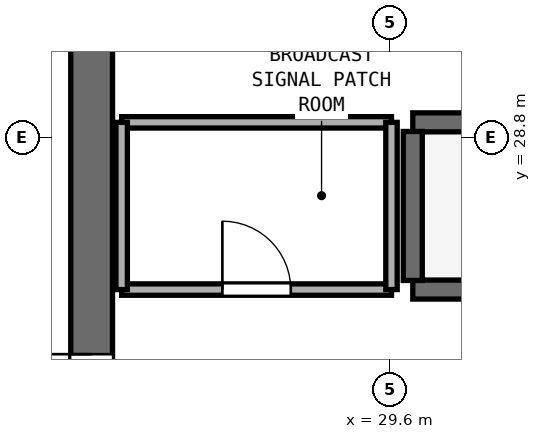
"""IFC4 building model, lengths in metres.
Left out: names, types, materials, properties, quantities, classifications, styles, units other than length and angle.
Written with IfcOpenShell. Run it as: python <this file> out.ifc"""

import sys

from ifc_helpers import new_model, si_unit, direction, frame, frame_2d, origin, place, context, subcontext, project, spatial, rectangle, extrude, element, fill, save


model = new_model("IFC4")
c1 = context("Model", 3, precision=1e-05, world=origin(), true_north=direction((0.0, 1.0)))
c2 = subcontext(c1, "Body", "Model", "MODEL_VIEW")
j1 = project(units=[si_unit("LENGTHUNIT", "METRE"), si_unit("PLANEANGLEUNIT", "RADIAN")], contexts=[c1])
p1 = place(None, origin())
s1 = spatial("IfcSite", under=j1, at=p1, CompositionType="ELEMENT")
p2 = place(p1, origin())
s2 = spatial("IfcBuilding", under=s1, at=p2, CompositionType="ELEMENT")
p3 = place(p2, frame((0.0, 0.0, 189.6)))
s3 = spatial("IfcBuildingStorey", under=s2, at=p3, CompositionType="ELEMENT", Elevation=189.6)
p4 = place(p3, frame((25.675, 17.55, 0.0), z_axis=(0.0, 0.0, 1.0), x_axis=(0.0, 1.0, 0.0)))
e1 = element("IfcWall", 1, at=p4, inside=s3, PredefinedType="SHEAR", context=c2, shape_type="SweptSolid", body=[
    extrude(rectangle(XDim=15.3, YDim=0.55, at=frame_2d((7.65, 0.0))), origin(), (0.0, 0.0, 1.0), 3.54),
])
p5 = place(p4, frame((6.9, 0.0, 0.0)))
e2 = element("IfcOpeningElement", 2, at=p5, cuts=e1, PredefinedType="OPENING", context=c2, shape_type="SweptSolid", body=[
    extrude(rectangle(XDim=1.5, YDim=2.15, at=frame_2d((0.75, 1.075))), frame((0.0, 0.285, 0.0), z_axis=(0.0, -1.0, 0.0), x_axis=(1.0, 0.0, 0.0)), (0.0, 0.0, 1.0), 0.57),
])
for number, where, z_axis, x_axis in (
    (3, (29.9, 26.8, 0.0), (0.0, 0.0, 1.0), (1.0, 0.0, 0.0)),
    (4, (29.9, 29.0, 0.0), (0.0, 0.0, 1.0), (1.0, 0.0, 0.0)),
):
    element("IfcWall", number, at=place(p3, frame(where, z_axis=z_axis, x_axis=x_axis)), inside=s3, PredefinedType="SHEAR", context=c2, shape_type="SweptSolid", body=[
        extrude(rectangle(XDim=1.72, YDim=0.25, at=frame_2d((0.86, 0.0))), origin(), (0.0, 0.0, 1.0), 3.54),
    ])
p6 = place(p3, frame((29.9, 26.92, 0.0), z_axis=(0.0, 0.0, 1.0), x_axis=(0.0, 1.0, 0.0)))
e5 = element("IfcWall", 5, at=p6, inside=s3, PredefinedType="SHEAR", context=c2, shape_type="SweptSolid", body=[
    extrude(rectangle(XDim=1.96, YDim=0.25, at=frame_2d((0.98, 0.0))), origin(), (0.0, 0.0, 1.0), 3.54),
])
p7 = place(p3, frame((26.07, 26.8, 0.0), z_axis=(0.0, 0.0, 1.0), x_axis=(1.0, 0.0, 0.0)))
e6 = element("IfcWall", 6, at=p7, inside=s3, PredefinedType="PARTITIONING", context=c2, shape_type="SweptSolid", body=[
    extrude(rectangle(XDim=3.55, YDim=0.15, at=frame_2d((1.775, 0.0))), origin(), (0.0, 0.0, 1.0), 3.54),
])
p8 = place(p7, frame((1.325, 0.0, 0.0)))
e7 = element("IfcOpeningElement", 7, at=p8, cuts=e6, PredefinedType="OPENING", context=c2, shape_type="SweptSolid", body=[
    extrude(rectangle(XDim=0.9, YDim=2.1, at=frame_2d((0.45, 1.05))), frame((0.0, 0.085, 0.0), z_axis=(0.0, -1.0, 0.0), x_axis=(1.0, 0.0, 0.0)), (0.0, 0.0, 1.0), 0.17),
])
p9 = place(p3, frame((26.07, 29.0, 0.0), z_axis=(0.0, 0.0, 1.0), x_axis=(1.0, 0.0, 0.0)))
e8 = element("IfcWall", 8, at=p9, inside=s3, PredefinedType="PARTITIONING", context=c2, shape_type="SweptSolid", body=[
    extrude(rectangle(XDim=3.55, YDim=0.15, at=frame_2d((1.775, 0.0))), origin(), (0.0, 0.0, 1.0), 3.54),
])
p10 = place(p3, frame((26.07, 26.8, 0.0), z_axis=(0.0, 0.0, 1.0), x_axis=(0.0, 1.0, 0.0)))
e9 = element("IfcWall", 9, at=p10, inside=s3, PredefinedType="PARTITIONING", context=c2, shape_type="SweptSolid", body=[
    extrude(rectangle(XDim=2.2, YDim=0.15, at=frame_2d((1.1, 0.0))), origin(), (0.0, 0.0, 1.0), 2.64),
])
p11 = place(p3, frame((29.62, 26.8, 0.0), z_axis=(0.0, 0.0, 1.0), x_axis=(0.0, 1.0, 0.0)))
e10 = element("IfcWall", 10, at=p11, inside=s3, PredefinedType="PARTITIONING", context=c2, shape_type="SweptSolid", body=[
    extrude(rectangle(XDim=2.2, YDim=0.15, at=frame_2d((1.1, 0.0))), origin(), (0.0, 0.0, 1.0), 3.54),
])
p12 = place(p5, origin())
e11 = element("IfcDoor", 11, at=p12, inside=s3, OperationType="DOUBLE_DOOR_SINGLE_SWING", PredefinedType="DOOR", context=c2, shape_type="SweptSolid", body=[
    extrude(rectangle(XDim=1.5, YDim=2.15, at=frame_2d((0.75, 1.075))), frame((0.0, 0.025, 0.0), z_axis=(0.0, -1.0, 0.0), x_axis=(1.0, 0.0, 0.0)), (0.0, 0.0, 1.0), 0.05),
])
fill(e2, e11)
p13 = place(p8, origin())
e12 = element("IfcDoor", 12, at=p13, inside=s3, OperationType="SINGLE_SWING_LEFT", PredefinedType="DOOR", context=c2, shape_type="SweptSolid", body=[
    extrude(rectangle(XDim=0.9, YDim=2.1, at=frame_2d((0.45, 1.05))), frame((0.0, 0.025, 0.0), z_axis=(0.0, -1.0, 0.0), x_axis=(1.0, 0.0, 0.0)), (0.0, 0.0, 1.0), 0.05),
])
fill(e7, e12)
save(model, sys.argv[1])
